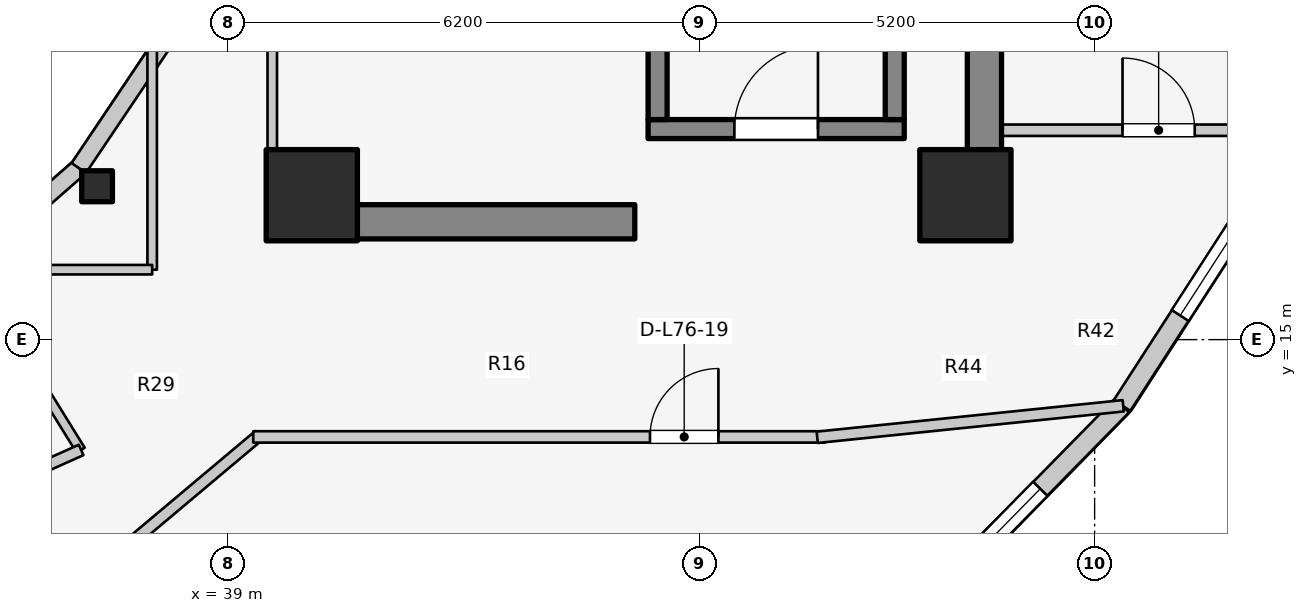
"""IFC4 building model, lengths in metres.
Left out: names, types, materials, properties, quantities, classifications, styles, units other than length and angle.
Written with IfcOpenShell. Run it as: python <this file> out.ifc"""

import sys

from ifc_helpers import new_model, si_unit, direction, frame, frame_2d, origin, origin_2d, place, context, subcontext, project, spatial, rectangle, i_section, extrude, element, fill, save


model = new_model("IFC4")
c1 = context("Model", 3, precision=1e-05, world=origin(), true_north=direction((0.0, 1.0)))
c2 = subcontext(c1, "Body", "Model", "MODEL_VIEW")
j1 = project(units=[si_unit("LENGTHUNIT", "METRE"), si_unit("PLANEANGLEUNIT", "RADIAN")], contexts=[c1])
p1 = place(None, origin())
s1 = spatial("IfcSite", under=j1, at=p1, CompositionType="ELEMENT")
p2 = place(p1, origin())
s2 = spatial("IfcBuilding", under=s1, at=p2, CompositionType="ELEMENT")
p3 = place(p2, frame((0.0, 0.0, 249.6)))
s3 = spatial("IfcBuildingStorey", under=s2, at=p3, CompositionType="ELEMENT", Elevation=249.6)
p4 = place(p3, frame((48.95, 17.05, 0.0), z_axis=(0.0, 0.0, 1.0), x_axis=(0.0, 1.0, 0.0)))
e1 = element("IfcWall", 1, at=p4, inside=s3, PredefinedType="SHEAR", context=c2, shape_type="SweptSolid", body=[
    extrude(rectangle(XDim=12.8, YDim=0.45, at=frame_2d((6.4, 0.0))), origin(), (0.0, 0.0, 1.0), 3.6),
])
p5 = place(p3, frame((39.85, 16.55, 0.0), z_axis=(0.0, 0.0, 1.0), x_axis=(1.0, 0.0, 0.0)))
e2 = element("IfcWall", 2, at=p5, inside=s3, PredefinedType="SHEAR", context=c2, shape_type="SweptSolid", body=[
    extrude(rectangle(XDim=4.5, YDim=0.45, at=frame_2d((2.25, 0.0))), origin(), (0.0, 0.0, 1.0), 3.6),
])
p6 = place(p3, frame((44.525, 17.77, 0.0), z_axis=(0.0, 0.0, 1.0), x_axis=(1.0, 0.0, 0.0)))
e3 = element("IfcWall", 3, at=p6, inside=s3, PredefinedType="SOLIDWALL", context=c2, shape_type="SweptSolid", body=[
    extrude(rectangle(XDim=3.37, YDim=0.25, at=frame_2d((1.685, 0.0))), origin(), (0.0, 0.0, 1.0), 3.6),
])
p7 = place(p6, frame((1.135, 0.0, 0.0)))
e4 = element("IfcOpeningElement", 4, at=p7, cuts=e3, PredefinedType="OPENING", context=c2, shape_type="SweptSolid", body=[
    extrude(rectangle(XDim=1.1, YDim=2.1, at=frame_2d((0.55, 1.05))), frame((0.0, 0.135, 0.0), z_axis=(0.0, -1.0, 0.0), x_axis=(1.0, 0.0, 0.0)), (0.0, 0.0, 1.0), 0.27),
])
for number, where, z_axis, x_axis in (
    (5, (44.65, 17.895, 0.0), (0.0, 0.0, 1.0), (0.0, 1.0, 0.0)),
    (6, (47.77, 17.895, 0.0), (0.0, 0.0, 1.0), (0.0, 1.0, 0.0)),
):
    element("IfcWall", number, at=place(p3, frame(where, z_axis=z_axis, x_axis=x_axis)), inside=s3, PredefinedType="SOLIDWALL", context=c2, shape_type="SweptSolid", body=[
        extrude(rectangle(XDim=7.81, YDim=0.25, at=frame_2d((3.905, 0.0))), origin(), (0.0, 0.0, 1.0), 3.6),
    ])
for number, where, z_axis, x_axis in (
    (7, (40.1, 16.9, 0.0), (0.0, 0.0, 1.0), (1.0, 0.0, 0.0)),
    (8, (48.7, 16.9, 0.0), (0.0, 0.0, 1.0), (1.0, 0.0, 0.0)),
):
    element("IfcColumn", number, at=place(p3, frame(where, z_axis=z_axis, x_axis=x_axis)), inside=s3, PredefinedType="COLUMN", context=c2, shape_type="SweptSolid", body=[
        extrude(rectangle(XDim=1.2, YDim=1.2, at=origin_2d()), origin(), (0.0, 0.0, 1.0), 3.6),
    ])
p8 = place(p3, frame((37.275, 17.018, 0.0), z_axis=(0.0, 0.0, 1.0), x_axis=(1.0, 0.0, 0.0)))
e9 = element("IfcColumn", 9, at=p8, inside=s3, PredefinedType="COLUMN", context=c2, shape_type="SweptSolid", body=[
    extrude(i_section(OverallWidth=0.404, OverallDepth=0.407, WebThickness=0.027, FlangeThickness=0.044, FilletRadius=0.025, at=origin_2d()), origin(), (0.0, 0.0, 1.0), 3.6),
])
p9 = place(p3, frame((35.56, 15.968, 0.0), z_axis=(0.0, 0.0, 1.0), x_axis=(0.752576694707, 0.658504607869, 0.0)))
e10 = element("IfcWall", 10, at=p9, inside=s3, PredefinedType="STANDARD", context=c2, shape_type="SweptSolid", body=[
    extrude(rectangle(XDim=1.959, YDim=0.23, at=frame_2d((0.98, 0.0))), origin(), (0.0, 0.0, 1.0), 2.6),
])
p10 = place(p3, frame((37.035, 17.258, 0.0), z_axis=(0.0, 0.0, 1.0), x_axis=(0.558197800898, 0.829707909492, 0.0)))
e11 = element("IfcWall", 11, at=p10, inside=s3, PredefinedType="STANDARD", context=c2, shape_type="SweptSolid", body=[
    extrude(rectangle(XDim=2.027, YDim=0.23, at=frame_2d((1.013, 0.0))), origin(), (0.0, 0.0, 1.0), 2.6),
])
p11 = place(p3, frame((47.558, 10.871, 0.0), z_axis=(0.0, 0.0, 1.0), x_axis=(0.700642973333, 0.713512034881, 0.0)))
e12 = element("IfcWall", 12, at=p11, inside=s3, PredefinedType="STANDARD", context=c2, shape_type="SweptSolid", body=[
    extrude(rectangle(XDim=4.572, YDim=0.26, at=frame_2d((2.286, 0.0))), origin(), (0.0, 0.0, 1.0), 3.29),
])
p12 = place(p11, frame((1.536, 0.0, 0.75)))
e13 = element("IfcOpeningElement", 13, at=p12, cuts=e12, PredefinedType="OPENING", context=c2, shape_type="SweptSolid", body=[
    extrude(rectangle(XDim=1.5, YDim=1.6, at=frame_2d((0.75, 0.8))), frame((0.0, 0.14, 0.0), z_axis=(0.0, -1.0, 0.0), x_axis=(1.0, 0.0, 0.0)), (0.0, 0.0, 1.0), 0.28),
])
p13 = place(p3, frame((50.761, 14.133, 0.0), z_axis=(0.0, 0.0, 1.0), x_axis=(0.542641766008, 0.839964233634, 0.0)))
e14 = element("IfcWall", 14, at=p13, inside=s3, PredefinedType="STANDARD", context=c2, shape_type="SweptSolid", body=[
    extrude(rectangle(XDim=4.319, YDim=0.26, at=frame_2d((2.16, 0.0))), origin(), (0.0, 0.0, 1.0), 3.29),
])
p14 = place(p13, frame((1.41, 0.0, 0.75)))
e15 = element("IfcOpeningElement", 15, at=p14, cuts=e14, PredefinedType="OPENING", context=c2, shape_type="SweptSolid", body=[
    extrude(rectangle(XDim=1.5, YDim=1.6, at=frame_2d((0.75, 0.8))), frame((0.0, 0.14, 0.0), z_axis=(0.0, -1.0, 0.0), x_axis=(1.0, 0.0, 0.0)), (0.0, 0.0, 1.0), 0.28),
])
p15 = place(p3, frame((39.58, 17.1, 0.0), z_axis=(0.0, 0.0, 1.0), x_axis=(0.0, 1.0, 0.0)))
e16 = element("IfcWall", 16, at=p15, inside=s3, PredefinedType="PARTITIONING", context=c2, shape_type="SweptSolid", body=[
    extrude(rectangle(XDim=2.04, YDim=0.125, at=frame_2d((1.02, 0.0))), origin(), (0.0, 0.0, 1.0), 2.672),
])
p16 = place(p3, frame((35.55, 15.985, 0.0), z_axis=(0.0, 0.0, 1.0), x_axis=(0.52592395012, -0.850531597702, 0.0)))
e17 = element("IfcWall", 17, at=p16, inside=s3, PredefinedType="PARTITIONING", context=c2, shape_type="SweptSolid", body=[
    extrude(rectangle(XDim=2.869, YDim=0.125, at=frame_2d((1.435, 0.0))), origin(), (0.0, 0.0, 1.0), 2.672),
])
p17 = place(p3, frame((34.617, 12.454, 0.0), z_axis=(0.0, 0.0, 1.0), x_axis=(0.912859324183, 0.408274239027, 0.0)))
e18 = element("IfcWall", 18, at=p17, inside=s3, PredefinedType="PARTITIONING", context=c2, shape_type="SweptSolid", body=[
    extrude(rectangle(XDim=2.682, YDim=0.15, at=frame_2d((1.341, 0.0))), origin(), (0.0, 0.0, 1.0), 2.816),
])
p18 = place(p17, frame((0.866, 0.0, 0.0)))
e19 = element("IfcOpeningElement", 19, at=p18, cuts=e18, PredefinedType="OPENING", context=c2, shape_type="SweptSolid", body=[
    extrude(rectangle(XDim=0.95, YDim=2.1, at=frame_2d((0.475, 1.05))), frame((0.0, 0.085, 0.0), z_axis=(0.0, -1.0, 0.0), x_axis=(1.0, 0.0, 0.0)), (0.0, 0.0, 1.0), 0.17),
])
p19 = place(p3, frame((38.0, 15.92, 0.0), z_axis=(0.0, 0.0, 1.0), x_axis=(0.0, 1.0, 0.0)))
e20 = element("IfcWall", 20, at=p19, inside=s3, PredefinedType="PARTITIONING", context=c2, shape_type="SweptSolid", body=[
    extrude(rectangle(XDim=4.28, YDim=0.125, at=frame_2d((2.14, 0.0))), origin(), (0.0, 0.0, 1.0), 2.672),
])
p20 = place(p3, frame((35.4, 15.92, 0.0), z_axis=(0.0, 0.0, 1.0), x_axis=(1.0, 0.0, 0.0)))
e21 = element("IfcWall", 21, at=p20, inside=s3, PredefinedType="PARTITIONING", context=c2, shape_type="SweptSolid", body=[
    extrude(rectangle(XDim=2.6, YDim=0.125, at=frame_2d((1.3, 0.0))), origin(), (0.0, 0.0, 1.0), 2.672),
])
p21 = place(p3, frame((48.95, 17.755, 0.0), z_axis=(0.0, 0.0, 1.0), x_axis=(1.0, 0.0, 0.0)))
e22 = element("IfcWall", 22, at=p21, inside=s3, PredefinedType="PARTITIONING", context=c2, shape_type="SweptSolid", body=[
    extrude(rectangle(XDim=4.175, YDim=0.15, at=frame_2d((2.087, 0.0))), origin(), (0.0, 0.0, 1.0), 3.295),
])
p22 = place(p21, frame((1.817, 0.0, 0.0)))
e23 = element("IfcOpeningElement", 23, at=p22, cuts=e22, PredefinedType="OPENING", context=c2, shape_type="SweptSolid", body=[
    extrude(rectangle(XDim=0.95, YDim=2.1, at=frame_2d((0.475, 1.05))), frame((0.0, 0.085, 0.0), z_axis=(0.0, -1.0, 0.0), x_axis=(1.0, 0.0, 0.0)), (0.0, 0.0, 1.0), 0.17),
])
p23 = place(p3, frame((37.791, 12.385, 0.0), z_axis=(0.0, 0.0, 1.0), x_axis=(0.765677451641, 0.643224719711, 0.0)))
e24 = element("IfcWall", 24, at=p23, inside=s3, PredefinedType="PARTITIONING", context=c2, shape_type="SweptSolid", body=[
    extrude(rectangle(XDim=2.105, YDim=0.15, at=frame_2d((1.053, 0.0))), origin(), (0.0, 0.0, 1.0), 2.816),
])
p24 = place(p3, frame((39.33, 13.72, 0.0), z_axis=(0.0, 0.0, 1.0), x_axis=(1.0, 0.0, 0.0)))
e25 = element("IfcWall", 25, at=p24, inside=s3, PredefinedType="PARTITIONING", context=c2, shape_type="SweptSolid", body=[
    extrude(rectangle(XDim=7.52, YDim=0.15, at=frame_2d((3.76, 0.0))), origin(), (0.0, 0.0, 1.0), 2.816),
])
p25 = place(p24, frame((5.22, 0.0, 0.0)))
e26 = element("IfcOpeningElement", 26, at=p25, cuts=e25, PredefinedType="OPENING", context=c2, shape_type="SweptSolid", body=[
    extrude(rectangle(XDim=0.9, YDim=2.1, at=frame_2d((0.45, 1.05))), frame((0.0, 0.085, 0.0), z_axis=(0.0, -1.0, 0.0), x_axis=(1.0, 0.0, 0.0)), (0.0, 0.0, 1.0), 0.17),
])
p26 = place(p3, frame((46.75, 13.715, 0.0), z_axis=(0.0, 0.0, 1.0), x_axis=(0.994734711466, 0.102483431859, 0.0)))
e27 = element("IfcWall", 27, at=p26, inside=s3, PredefinedType="PARTITIONING", context=c2, shape_type="SweptSolid", body=[
    extrude(rectangle(XDim=4.047, YDim=0.15, at=frame_2d((2.024, 0.0))), origin(), (0.0, 0.0, 1.0), 2.66),
])
p27 = place(p12, origin())
e28 = element("IfcWindow", 28, at=p27, inside=s3, PartitioningType="SINGLE_PANEL", PredefinedType="WINDOW", context=c2, shape_type="SweptSolid", body=[
    extrude(rectangle(XDim=1.5, YDim=1.6, at=frame_2d((0.75, 0.8))), frame((0.0, 0.03, 0.0), z_axis=(0.0, -1.0, 0.0), x_axis=(1.0, 0.0, 0.0)), (0.0, 0.0, 1.0), 0.06),
])
fill(e13, e28)
p28 = place(p14, origin())
e29 = element("IfcWindow", 29, at=p28, inside=s3, PartitioningType="SINGLE_PANEL", PredefinedType="WINDOW", context=c2, shape_type="SweptSolid", body=[
    extrude(rectangle(XDim=1.5, YDim=1.6, at=frame_2d((0.75, 0.8))), frame((0.0, 0.03, 0.0), z_axis=(0.0, -1.0, 0.0), x_axis=(1.0, 0.0, 0.0)), (0.0, 0.0, 1.0), 0.06),
])
fill(e15, e29)
p29 = place(p7, origin())
e30 = element("IfcDoor", 30, at=p29, inside=s3, OperationType="SINGLE_SWING_RIGHT", PredefinedType="DOOR", context=c2, shape_type="SweptSolid", body=[
    extrude(rectangle(XDim=1.1, YDim=2.1, at=frame_2d((0.55, 1.05))), frame((0.0, 0.025, 0.0), z_axis=(0.0, -1.0, 0.0), x_axis=(1.0, 0.0, 0.0)), (0.0, 0.0, 1.0), 0.05),
])
fill(e4, e30)
p30 = place(p22, origin())
e31 = element("IfcDoor", 31, at=p30, inside=s3, OperationType="SINGLE_SWING_LEFT", PredefinedType="DOOR", context=c2, shape_type="SweptSolid", body=[
    extrude(rectangle(XDim=0.95, YDim=2.1, at=frame_2d((0.475, 1.05))), frame((0.0, 0.025, 0.0), z_axis=(0.0, -1.0, 0.0), x_axis=(1.0, 0.0, 0.0)), (0.0, 0.0, 1.0), 0.05),
])
fill(e23, e31)
p31 = place(p25, origin())
e32 = element("IfcDoor", 32, at=p31, inside=s3, OperationType="SINGLE_SWING_RIGHT", PredefinedType="DOOR", context=c2, shape_type="SweptSolid", body=[
    extrude(rectangle(XDim=0.9, YDim=2.1, at=frame_2d((0.45, 1.05))), frame((0.0, 0.025, 0.0), z_axis=(0.0, -1.0, 0.0), x_axis=(1.0, 0.0, 0.0)), (0.0, 0.0, 1.0), 0.05),
])
fill(e26, e32)
save(model, sys.argv[1])
